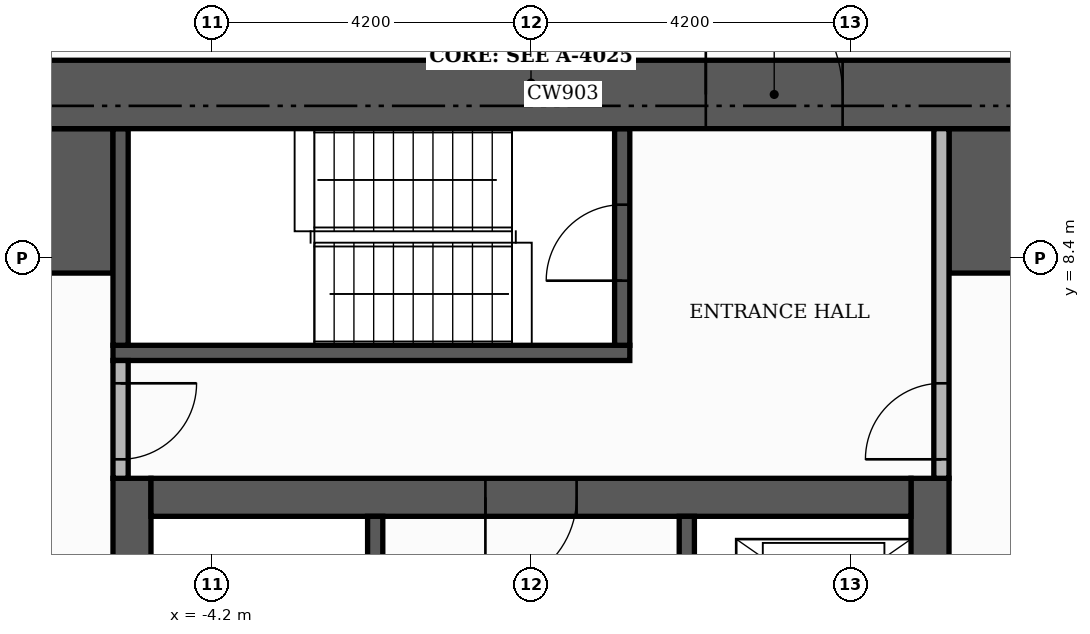
"""IFC4 building model, lengths in metres.
Left out: names, types, materials, properties, quantities, classifications, styles, units other than length and angle.
Written with IfcOpenShell. Run it as: python <this file> out.ifc"""

import sys

from ifc_helpers import new_model, si_unit, direction, frame, frame_2d, origin, place, context, subcontext, project, spatial, rectangle, extrude, element, fill, save


model = new_model("IFC4")
c1 = context("Model", 3, precision=1e-05, world=origin(), true_north=direction((0.0, 1.0)))
c2 = subcontext(c1, "Body", "Model", "MODEL_VIEW")
j1 = project(units=[si_unit("LENGTHUNIT", "METRE"), si_unit("PLANEANGLEUNIT", "RADIAN")], contexts=[c1])
p1 = place(None, origin())
s1 = spatial("IfcSite", under=j1, at=p1, CompositionType="ELEMENT")
p2 = place(p1, origin())
s2 = spatial("IfcBuilding", under=s1, at=p2, CompositionType="ELEMENT")
p3 = place(p2, frame((0.0, 0.0, 149.4)))
s3 = spatial("IfcBuildingStorey", under=s2, at=p3, CompositionType="ELEMENT", Elevation=149.4)
for number, where, z_axis, x_axis in (
    (1, (-5.25, -5.0, 0.0), (0.0, 0.0, 1.0), (0.0, 1.0, 0.0)),
    (2, (5.25, -5.0, 0.0), (0.0, 0.0, 1.0), (0.0, 1.0, 0.0)),
):
    element("IfcWall", number, at=place(p3, frame(where, z_axis=z_axis, x_axis=x_axis)), inside=s3, PredefinedType="SHEAR", context=c2, shape_type="SweptSolid", body=[
        extrude(rectangle(XDim=10.5, YDim=0.5, at=frame_2d((5.25, 0.0))), origin(), (0.0, 0.0, 1.0), 3.48),
    ])
p4 = place(p3, frame((-5.0, 5.25, 0.0), z_axis=(0.0, 0.0, 1.0), x_axis=(1.0, 0.0, 0.0)))
e3 = element("IfcWall", 3, at=p4, inside=s3, PredefinedType="SHEAR", context=c2, shape_type="SweptSolid", body=[
    extrude(rectangle(XDim=10.0, YDim=0.5, at=frame_2d((5.0, 0.0))), origin(), (0.0, 0.0, 1.0), 3.48),
])
p5 = place(p4, frame((4.4, 0.0, 0.0)))
e4 = element("IfcOpeningElement", 4, at=p5, cuts=e3, PredefinedType="OPENING", context=c2, shape_type="SweptSolid", body=[
    extrude(rectangle(XDim=1.2, YDim=2.1, at=frame_2d((0.6, 1.05))), frame((0.0, 0.26, 0.0), z_axis=(0.0, -1.0, 0.0), x_axis=(1.0, 0.0, 0.0)), (0.0, 0.0, 1.0), 0.52),
])
for number, where, z_axis, x_axis in (
    (5, (-10.1, 9.15, 0.0), (0.0, 0.0, 1.0), (1.0, 0.0, 0.0)),
    (6, (5.5, 9.15, 0.0), (0.0, 0.0, 1.0), (1.0, 0.0, 0.0)),
):
    element("IfcWall", number, at=place(p3, frame(where, z_axis=z_axis, x_axis=x_axis)), inside=s3, PredefinedType="SHEAR", context=c2, shape_type="SweptSolid", body=[
        extrude(rectangle(XDim=4.6, YDim=1.9, at=frame_2d((2.3, 0.0))), origin(), (0.0, 0.0, 1.0), 3.48),
    ])
p6 = place(p3, frame((-2.05, -1.4, 0.0), z_axis=(0.0, 0.0, 1.0), x_axis=(0.0, 1.0, 0.0)))
e7 = element("IfcWall", 7, at=p6, inside=s3, PredefinedType="SHEAR", context=c2, shape_type="SweptSolid", body=[
    extrude(rectangle(XDim=6.4, YDim=0.2, at=frame_2d((3.2, 0.0))), origin(), (0.0, 0.0, 1.0), 3.48),
])
p7 = place(p6, frame((0.15, 0.0, 0.0)))
e8 = element("IfcOpeningElement", 8, at=p7, cuts=e7, PredefinedType="OPENING", context=c2, shape_type="SweptSolid", body=[
    extrude(rectangle(XDim=1.0, YDim=2.1, at=frame_2d((0.5, 1.05))), frame((0.0, 0.11, 0.0), z_axis=(0.0, -1.0, 0.0), x_axis=(1.0, 0.0, 0.0)), (0.0, 0.0, 1.0), 0.22),
])
p8 = place(p3, frame((-5.5, 7.15, 0.0), z_axis=(0.0, 0.0, 1.0), x_axis=(1.0, 0.0, 0.0)))
e9 = element("IfcWall", 9, at=p8, inside=s3, PredefinedType="SHEAR", context=c2, shape_type="SweptSolid", body=[
    extrude(rectangle(XDim=6.8, YDim=0.2, at=frame_2d((3.4, 0.0))), origin(), (0.0, 0.0, 1.0), 3.48),
])
p9 = place(p3, frame((-5.4, 7.25, 0.0), z_axis=(0.0, 0.0, 1.0), x_axis=(0.0, 1.0, 0.0)))
e10 = element("IfcWall", 10, at=p9, inside=s3, PredefinedType="SHEAR", context=c2, shape_type="SweptSolid", body=[
    extrude(rectangle(XDim=2.85, YDim=0.2, at=frame_2d((1.425, 0.0))), origin(), (0.0, 0.0, 1.0), 3.48),
])
p10 = place(p3, frame((1.2, 7.25, 0.0), z_axis=(0.0, 0.0, 1.0), x_axis=(0.0, 1.0, 0.0)))
e11 = element("IfcWall", 11, at=p10, inside=s3, PredefinedType="SHEAR", context=c2, shape_type="SweptSolid", body=[
    extrude(rectangle(XDim=2.85, YDim=0.2, at=frame_2d((1.425, 0.0))), origin(), (0.0, 0.0, 1.0), 3.48),
])
p11 = place(p10, frame((0.85, 0.0, 0.0)))
e12 = element("IfcOpeningElement", 12, at=p11, cuts=e11, PredefinedType="OPENING", context=c2, shape_type="SweptSolid", body=[
    extrude(rectangle(XDim=1.0, YDim=2.1, at=frame_2d((0.5, 1.05))), frame((0.0, 0.11, 0.0), z_axis=(0.0, -1.0, 0.0), x_axis=(1.0, 0.0, 0.0)), (0.0, 0.0, 1.0), 0.22),
])
p12 = place(p3, frame((2.05, 1.6, 0.0), z_axis=(0.0, 0.0, 1.0), x_axis=(0.0, 1.0, 0.0)))
e13 = element("IfcWall", 13, at=p12, inside=s3, PredefinedType="SHEAR", context=c2, shape_type="SweptSolid", body=[
    extrude(rectangle(XDim=3.4, YDim=0.2, at=frame_2d((1.7, 0.0))), origin(), (0.0, 0.0, 1.0), 3.48),
])
p13 = place(p12, frame((1.75, 0.0, 0.0)))
e14 = element("IfcOpeningElement", 14, at=p13, cuts=e13, PredefinedType="OPENING", context=c2, shape_type="SweptSolid", body=[
    extrude(rectangle(XDim=1.1, YDim=2.1, at=frame_2d((0.55, 1.05))), frame((0.0, 0.11, 0.0), z_axis=(0.0, -1.0, 0.0), x_axis=(1.0, 0.0, 0.0)), (0.0, 0.0, 1.0), 0.22),
])
p14 = place(p12, frame((0.15, 0.0, 0.0)))
e15 = element("IfcOpeningElement", 15, at=p14, cuts=e13, PredefinedType="OPENING", context=c2, shape_type="SweptSolid", body=[
    extrude(rectangle(XDim=0.8, YDim=2.1, at=frame_2d((0.4, 1.05))), frame((0.0, 0.11, 0.0), z_axis=(0.0, -1.0, 0.0), x_axis=(1.0, 0.0, 0.0)), (0.0, 0.0, 1.0), 0.22),
])
p15 = place(p3, frame((-11.0, 10.55, 0.0), z_axis=(0.0, 0.0, 1.0), x_axis=(1.0, 0.0, 0.0)))
e16 = element("IfcWall", 16, at=p15, inside=s3, PredefinedType="SHEAR", context=c2, shape_type="SweptSolid", body=[
    extrude(rectangle(XDim=22.0, YDim=0.9, at=frame_2d((11.0, 0.0))), origin(), (0.0, 0.0, 1.0), 3.48),
])
p16 = place(p15, frame((13.3, 0.0, 0.0)))
e17 = element("IfcOpeningElement", 17, at=p16, cuts=e16, PredefinedType="OPENING", context=c2, shape_type="SweptSolid", body=[
    extrude(rectangle(XDim=1.8, YDim=2.2, at=frame_2d((0.9, 1.1))), frame((0.0, 0.46, 0.0), z_axis=(0.0, -1.0, 0.0), x_axis=(1.0, 0.0, 0.0)), (0.0, 0.0, 1.0), 0.92),
])
p17 = place(p3, frame((-5.4, 5.5, 0.0), z_axis=(0.0, 0.0, 1.0), x_axis=(0.0, 1.0, 0.0)))
e18 = element("IfcWall", 18, at=p17, inside=s3, PredefinedType="PARTITIONING", context=c2, shape_type="SweptSolid", body=[
    extrude(rectangle(XDim=1.55, YDim=0.2, at=frame_2d((0.775, 0.0))), origin(), (0.0, 0.0, 1.0), 3.48),
])
p18 = place(p17, frame((0.25, 0.0, 0.0)))
e19 = element("IfcOpeningElement", 19, at=p18, cuts=e18, PredefinedType="OPENING", context=c2, shape_type="SweptSolid", body=[
    extrude(rectangle(XDim=1.0, YDim=2.1, at=frame_2d((0.5, 1.05))), frame((0.0, 0.11, 0.0), z_axis=(0.0, -1.0, 0.0), x_axis=(1.0, 0.0, 0.0)), (0.0, 0.0, 1.0), 0.22),
])
p19 = place(p3, frame((5.4, 5.5, 0.0), z_axis=(0.0, 0.0, 1.0), x_axis=(0.0, 1.0, 0.0)))
e20 = element("IfcWall", 20, at=p19, inside=s3, PredefinedType="PARTITIONING", context=c2, shape_type="SweptSolid", body=[
    extrude(rectangle(XDim=4.6, YDim=0.2, at=frame_2d((2.3, 0.0))), origin(), (0.0, 0.0, 1.0), 3.48),
])
p20 = place(p19, frame((0.25, 0.0, 0.0)))
e21 = element("IfcOpeningElement", 21, at=p20, cuts=e20, PredefinedType="OPENING", context=c2, shape_type="SweptSolid", body=[
    extrude(rectangle(XDim=1.0, YDim=2.1, at=frame_2d((0.5, 1.05))), frame((0.0, 0.11, 0.0), z_axis=(0.0, -1.0, 0.0), x_axis=(1.0, 0.0, 0.0)), (0.0, 0.0, 1.0), 0.22),
])
p21 = place(p5, frame((1.2, 0.0, 0.0), z_axis=(0.0, 0.0, 1.0), x_axis=(-1.0, 0.0, 0.0)))
e22 = element("IfcDoor", 22, at=p21, inside=s3, OperationType="SINGLE_SWING_LEFT", PredefinedType="DOOR", context=c2, shape_type="SweptSolid", body=[
    extrude(rectangle(XDim=1.2, YDim=2.1, at=frame_2d((0.6, 1.05))), frame((0.0, 0.025, 0.0), z_axis=(0.0, -1.0, 0.0), x_axis=(1.0, 0.0, 0.0)), (0.0, 0.0, 1.0), 0.05),
])
fill(e4, e22)
p22 = place(p11, origin())
e23 = element("IfcDoor", 23, at=p22, inside=s3, OperationType="SINGLE_SWING_LEFT", PredefinedType="DOOR", context=c2, shape_type="SweptSolid", body=[
    extrude(rectangle(XDim=1.0, YDim=2.1, at=frame_2d((0.5, 1.05))), frame((0.0, 0.025, 0.0), z_axis=(0.0, -1.0, 0.0), x_axis=(1.0, 0.0, 0.0)), (0.0, 0.0, 1.0), 0.05),
])
fill(e12, e23)
p23 = place(p18, frame((1.0, 0.0, 0.0), z_axis=(0.0, 0.0, 1.0), x_axis=(-1.0, 0.0, 0.0)))
e24 = element("IfcDoor", 24, at=p23, inside=s3, OperationType="SINGLE_SWING_RIGHT", PredefinedType="DOOR", context=c2, shape_type="SweptSolid", body=[
    extrude(rectangle(XDim=1.0, YDim=2.1, at=frame_2d((0.5, 1.05))), frame((0.0, 0.025, 0.0), z_axis=(0.0, -1.0, 0.0), x_axis=(1.0, 0.0, 0.0)), (0.0, 0.0, 1.0), 0.05),
])
fill(e19, e24)
p24 = place(p20, origin())
e25 = element("IfcDoor", 25, at=p24, inside=s3, OperationType="SINGLE_SWING_LEFT", PredefinedType="DOOR", context=c2, shape_type="SweptSolid", body=[
    extrude(rectangle(XDim=1.0, YDim=2.1, at=frame_2d((0.5, 1.05))), frame((0.0, 0.025, 0.0), z_axis=(0.0, -1.0, 0.0), x_axis=(1.0, 0.0, 0.0)), (0.0, 0.0, 1.0), 0.05),
])
fill(e21, e25)
p25 = place(p16, origin())
e26 = element("IfcDoor", 26, at=p25, inside=s3, OperationType="DOUBLE_DOOR_SINGLE_SWING", PredefinedType="DOOR", context=c2, shape_type="SweptSolid", body=[
    extrude(rectangle(XDim=1.8, YDim=2.2, at=frame_2d((0.9, 1.1))), frame((0.0, 0.025, 0.0), z_axis=(0.0, -1.0, 0.0), x_axis=(1.0, 0.0, 0.0)), (0.0, 0.0, 1.0), 0.05),
])
fill(e17, e26)
save(model, sys.argv[1])
